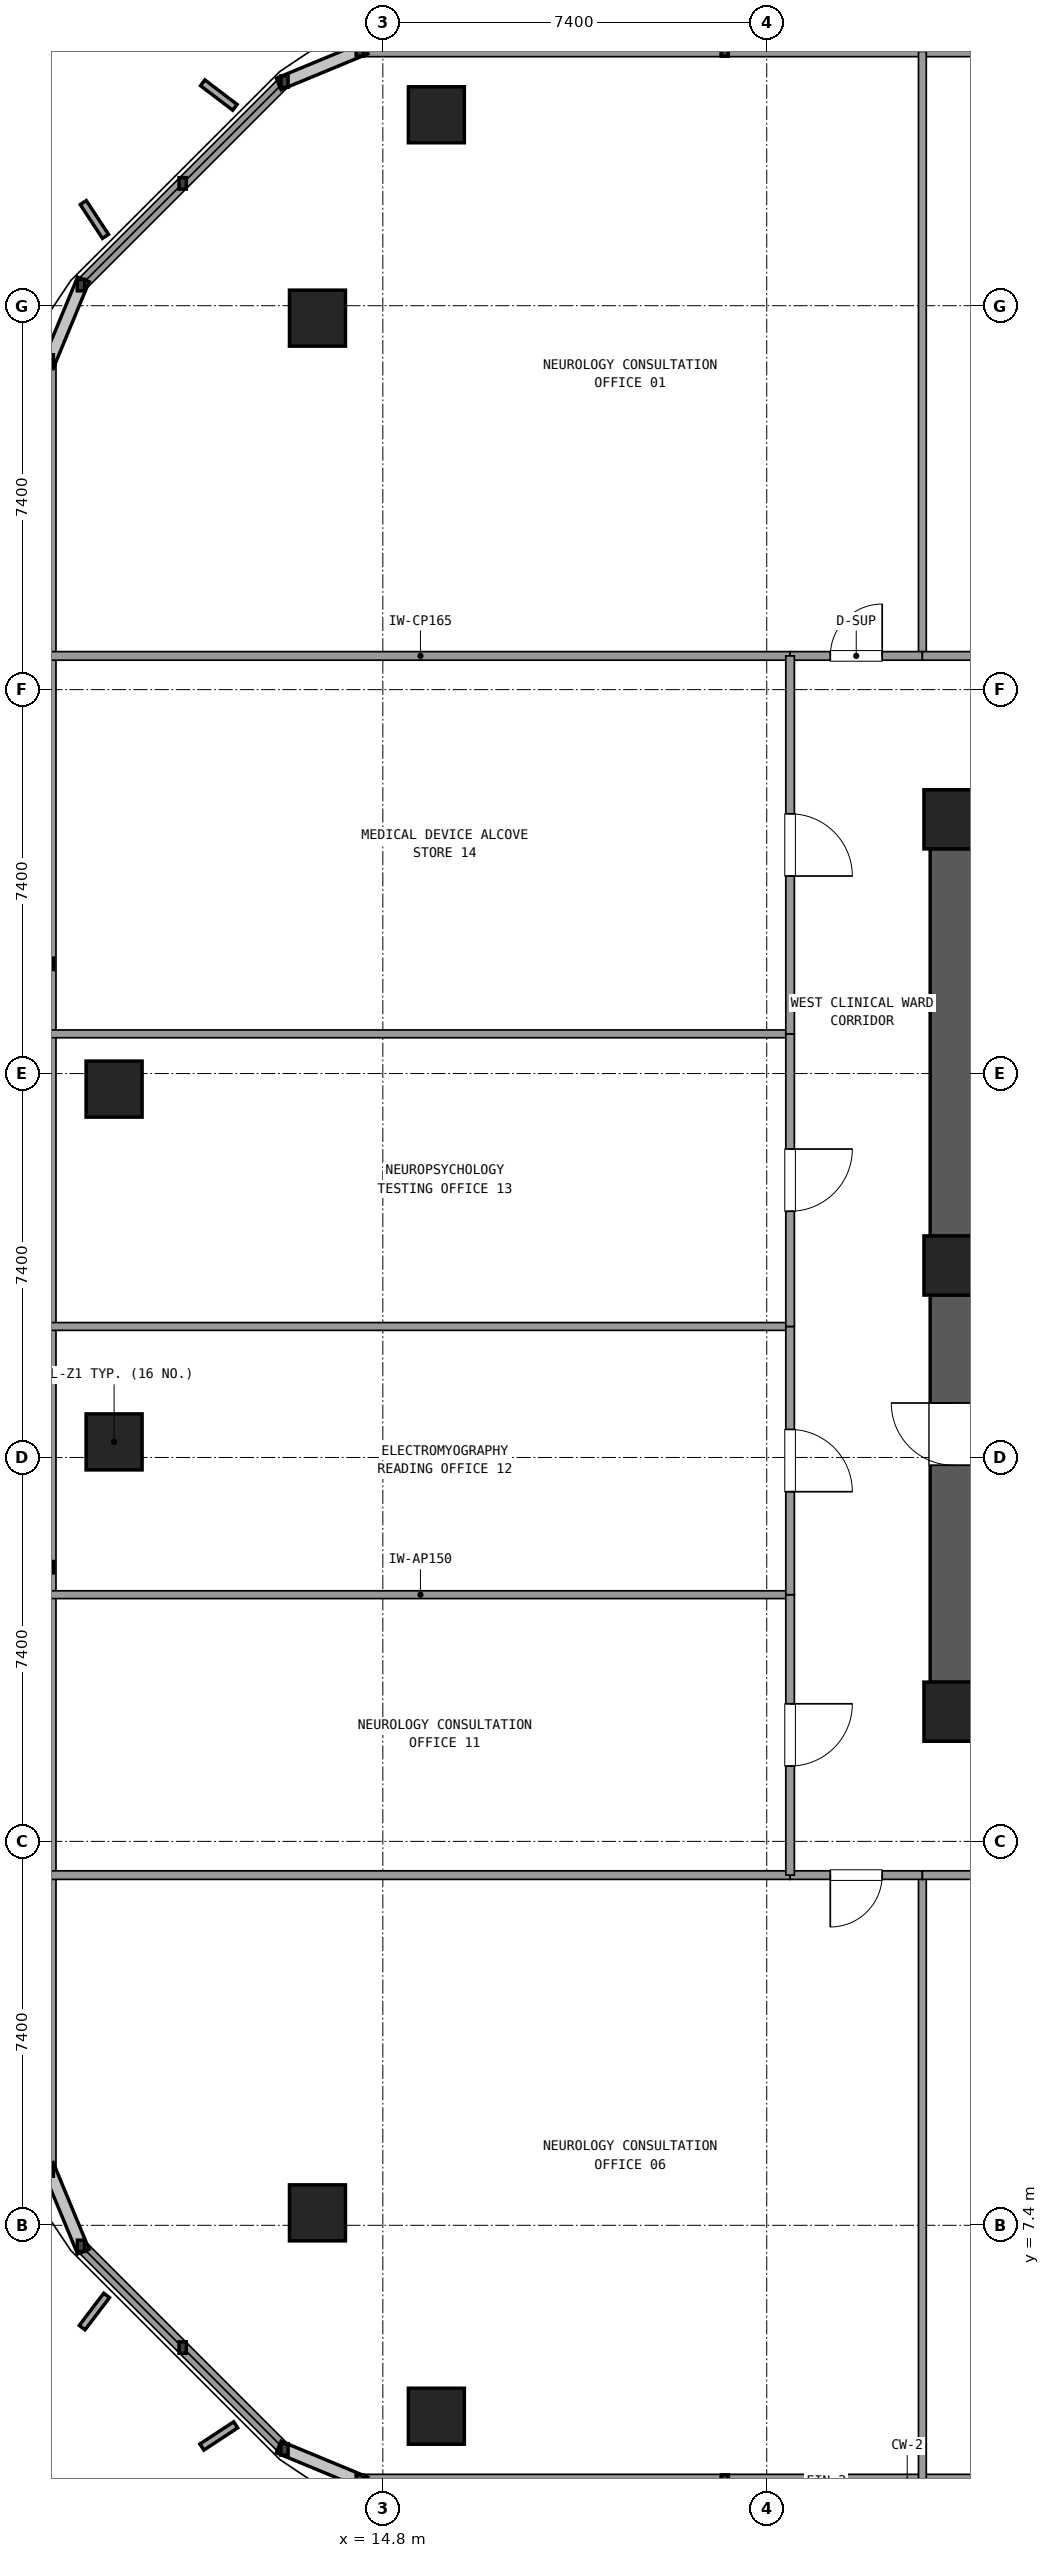
"""IFC4 building model, lengths in metres.
Left out: names, types, materials, properties, quantities, classifications, styles, units other than length and angle.
Written with IfcOpenShell. Run it as: python <this file> out.ifc"""

import sys

from ifc_helpers import new_model, si_unit, direction, frame, frame_2d, origin, origin_2d, place, context, subcontext, project, spatial, rectangle, extrude, element, fill, save


model = new_model("IFC4")
c1 = context("Model", 3, precision=1e-05, world=origin(), true_north=direction((0.0, 1.0)))
c2 = subcontext(c1, "Body", "Model", "MODEL_VIEW")
j1 = project(units=[si_unit("LENGTHUNIT", "METRE"), si_unit("PLANEANGLEUNIT", "RADIAN")], contexts=[c1])
p1 = place(None, origin())
s1 = spatial("IfcSite", under=j1, at=p1, CompositionType="ELEMENT")
p2 = place(p1, origin())
s2 = spatial("IfcBuilding", under=s1, at=p2, CompositionType="ELEMENT")
p3 = place(p2, frame((0.0, 0.0, 67.14)))
s3 = spatial("IfcBuildingStorey", under=s2, at=p3, CompositionType="ELEMENT", Elevation=67.14)
for number, where, z_axis, x_axis in (
    (1, (25.8, 17.3, 0.0), (0.0, 0.0, 1.0), (1.0, 0.0, 0.0)),
    (2, (25.8, 34.5, 0.0), (0.0, 0.0, 1.0), (1.0, 0.0, 0.0)),
    (3, (25.8, 25.9, 0.0), (0.0, 0.0, 1.0), (1.0, 0.0, 0.0)),
):
    element("IfcColumn", number, at=place(p3, frame(where, z_axis=z_axis, x_axis=x_axis)), inside=s3, PredefinedType="COLUMN", context=c2, shape_type="SweptSolid", body=[
        extrude(rectangle(XDim=1.14, YDim=1.14, at=origin_2d()), origin(), (0.0, 0.0, 1.0), 3.6),
    ])
p4 = place(p3, frame((25.8, 33.935, 0.0), z_axis=(0.0, 0.0, 1.0), x_axis=(0.0, -1.0, 0.0)))
e4 = element("IfcWall", 4, at=p4, inside=s3, PredefinedType="SHEAR", context=c2, shape_type="SweptSolid", body=[
    extrude(rectangle(XDim=7.47, YDim=0.9, at=frame_2d((3.735, 0.0))), origin(), (0.0, 0.0, 1.0), 3.3),
])
p5 = place(p3, frame((25.8, 25.335, 0.0), z_axis=(0.0, 0.0, 1.0), x_axis=(0.0, -1.0, 0.0)))
e5 = element("IfcWall", 5, at=p5, inside=s3, PredefinedType="SHEAR", context=c2, shape_type="SweptSolid", body=[
    extrude(rectangle(XDim=7.47, YDim=0.9, at=frame_2d((3.735, 0.0))), origin(), (0.0, 0.0, 1.0), 3.3),
])
p6 = place(p5, frame((2.085, 0.0, 0.0)))
e6 = element("IfcOpeningElement", 6, at=p6, cuts=e5, PredefinedType="OPENING", context=c2, shape_type="SweptSolid", body=[
    extrude(rectangle(XDim=1.2, YDim=2.15, at=frame_2d((0.6, 1.075))), frame((0.0, 0.46, 0.0), z_axis=(0.0, -1.0, 0.0), x_axis=(1.0, 0.0, 0.0)), (0.0, 0.0, 1.0), 0.92),
])
for number, where, z_axis, x_axis in (
    (7, (9.62, 22.5, 0.0), (0.0, 0.0, 1.0), (1.0, 0.0, 0.0)),
    (8, (13.54, 7.64, 0.0), (0.0, 0.0, 1.0), (1.0, 0.0, 0.0)),
    (9, (15.832, 3.72, 0.0), (0.0, 0.0, 1.0), (1.0, 0.0, 0.0)),
    (10, (15.832, 48.08, 0.0), (0.0, 0.0, 1.0), (1.0, 0.0, 0.0)),
    (11, (13.54, 44.16, 0.0), (0.0, 0.0, 1.0), (1.0, 0.0, 0.0)),
    (12, (9.62, 29.3, 0.0), (0.0, 0.0, 1.0), (1.0, 0.0, 0.0)),
):
    element("IfcColumn", number, at=place(p3, frame(where, z_axis=z_axis, x_axis=x_axis)), inside=s3, PredefinedType="COLUMN", context=c2, shape_type="SweptSolid", body=[
        extrude(rectangle(XDim=1.08, YDim=1.08, at=origin_2d()), origin(), (0.0, 0.0, 1.0), 3.6),
    ])
for number, where, z_axis, x_axis in (
    (13, (14.355, 2.48, 0.0), (0.0, 0.0, 1.0), (1.0, 0.0, 0.0)),
    (14, (35.46, 49.32, 0.0), (0.0, 0.0, 1.0), (-1.0, 0.0, 0.0)),
):
    element("IfcWall", number, at=place(p3, frame(where, z_axis=z_axis, x_axis=x_axis)), inside=s3, PredefinedType="SOLIDWALL", context=c2, shape_type="SweptSolid", body=[
        extrude(rectangle(XDim=21.105, YDim=0.24, at=frame_2d((10.552, 0.0))), origin(), (0.0, 0.0, 1.0), 0.85),
    ])
p7 = place(p3, frame((12.904, 48.719, 0.0), z_axis=(0.0, 0.0, 1.0), x_axis=(-0.707106781187, -0.707106781187, 0.0)))
e15 = element("IfcWall", 15, at=p7, inside=s3, PredefinedType="SOLIDWALL", context=c2, shape_type="SweptSolid", body=[
    extrude(rectangle(XDim=5.548, YDim=0.24, at=frame_2d((2.774, 0.0))), origin(), (0.0, 0.0, 1.0), 0.85),
])
p8 = place(p3, frame((8.38, 43.345, 0.0), z_axis=(0.0, 0.0, 1.0), x_axis=(0.0, -1.0, 0.0)))
e16 = element("IfcWall", 16, at=p8, inside=s3, PredefinedType="SOLIDWALL", context=c2, shape_type="SweptSolid", body=[
    extrude(rectangle(XDim=34.89, YDim=0.24, at=frame_2d((17.445, 0.0))), origin(), (0.0, 0.0, 1.0), 0.85),
])
p9 = place(p3, frame((8.981, 7.004, 0.0), z_axis=(0.0, 0.0, 1.0), x_axis=(0.707128783731, -0.707084777957, 0.0)))
e17 = element("IfcWall", 17, at=p9, inside=s3, PredefinedType="SOLIDWALL", context=c2, shape_type="SweptSolid", body=[
    extrude(rectangle(XDim=5.548, YDim=0.24, at=frame_2d((2.774, 0.0))), origin(), (0.0, 0.0, 1.0), 0.85),
])
for number, where, z_axis, x_axis in (
    (18, (8.4, 37.65, 0.0), (0.0, 0.0, 1.0), (1.0, 0.0, 0.0)),
    (19, (8.4, 14.15, 0.0), (0.0, 0.0, 1.0), (1.0, 0.0, 0.0)),
):
    element("IfcWall", number, at=place(p3, frame(where, z_axis=z_axis, x_axis=x_axis)), inside=s3, PredefinedType="PARTITIONING", context=c2, shape_type="SweptSolid", body=[
        extrude(rectangle(XDim=14.25, YDim=0.165, at=frame_2d((7.125, 0.0))), origin(), (0.0, 0.0, 1.0), 2.59),
    ])
p10 = place(p3, frame((25.2, 37.65, 0.0), z_axis=(0.0, 0.0, 1.0), x_axis=(0.0, 1.0, 0.0)))
e20 = element("IfcWall", 20, at=p10, inside=s3, PredefinedType="PARTITIONING", context=c2, shape_type="SweptSolid", body=[
    extrude(rectangle(XDim=11.65, YDim=0.15, at=frame_2d((5.825, 0.0))), origin(), (0.0, 0.0, 1.0), 2.59),
])
p11 = place(p3, frame((22.65, 37.65, 0.0), z_axis=(0.0, 0.0, 1.0), x_axis=(1.0, 0.0, 0.0)))
e21 = element("IfcWall", 21, at=p11, inside=s3, PredefinedType="PARTITIONING", context=c2, shape_type="SweptSolid", body=[
    extrude(rectangle(XDim=2.55, YDim=0.165, at=frame_2d((1.275, 0.0))), origin(), (0.0, 0.0, 1.0), 2.59),
])
p12 = place(p11, frame((0.775, 0.0, 0.0)))
e22 = element("IfcOpeningElement", 22, at=p12, cuts=e21, PredefinedType="OPENING", context=c2, shape_type="SweptSolid", body=[
    extrude(rectangle(XDim=1.0, YDim=2.15, at=frame_2d((0.5, 1.075))), frame((0.0, 0.093, 0.0), z_axis=(0.0, -1.0, 0.0), x_axis=(1.0, 0.0, 0.0)), (0.0, 0.0, 1.0), 0.185),
])
p13 = place(p3, frame((25.2, 37.65, 0.0), z_axis=(0.0, 0.0, 1.0), x_axis=(1.0, 0.0, 0.0)))
e23 = element("IfcWall", 23, at=p13, inside=s3, PredefinedType="PARTITIONING", context=c2, shape_type="SweptSolid", body=[
    extrude(rectangle(XDim=7.751, YDim=0.165, at=frame_2d((3.875, 0.0))), origin(), (0.0, 0.0, 1.0), 2.59),
])
p14 = place(p13, frame((3.276, 0.0, 0.0)))
e24 = element("IfcOpeningElement", 24, at=p14, cuts=e23, PredefinedType="OPENING", context=c2, shape_type="SweptSolid", body=[
    extrude(rectangle(XDim=1.2, YDim=2.15, at=frame_2d((0.6, 1.075))), frame((0.0, 0.093, 0.0), z_axis=(0.0, -1.0, 0.0), x_axis=(1.0, 0.0, 0.0)), (0.0, 0.0, 1.0), 0.185),
])
p15 = place(p3, frame((25.2, 14.15, 0.0), z_axis=(0.0, 0.0, 1.0), x_axis=(0.0, -1.0, 0.0)))
e25 = element("IfcWall", 25, at=p15, inside=s3, PredefinedType="PARTITIONING", context=c2, shape_type="SweptSolid", body=[
    extrude(rectangle(XDim=11.65, YDim=0.15, at=frame_2d((5.825, 0.0))), origin(), (0.0, 0.0, 1.0), 2.59),
])
p16 = place(p3, frame((22.65, 14.15, 0.0), z_axis=(0.0, 0.0, 1.0), x_axis=(1.0, 0.0, 0.0)))
e26 = element("IfcWall", 26, at=p16, inside=s3, PredefinedType="PARTITIONING", context=c2, shape_type="SweptSolid", body=[
    extrude(rectangle(XDim=2.55, YDim=0.165, at=frame_2d((1.275, 0.0))), origin(), (0.0, 0.0, 1.0), 2.59),
])
p17 = place(p16, frame((0.775, 0.0, 0.0)))
e27 = element("IfcOpeningElement", 27, at=p17, cuts=e26, PredefinedType="OPENING", context=c2, shape_type="SweptSolid", body=[
    extrude(rectangle(XDim=1.0, YDim=2.15, at=frame_2d((0.5, 1.075))), frame((0.0, 0.093, 0.0), z_axis=(0.0, -1.0, 0.0), x_axis=(1.0, 0.0, 0.0)), (0.0, 0.0, 1.0), 0.185),
])
p18 = place(p3, frame((25.2, 14.15, 0.0), z_axis=(0.0, 0.0, 1.0), x_axis=(1.0, 0.0, 0.0)))
e28 = element("IfcWall", 28, at=p18, inside=s3, PredefinedType="PARTITIONING", context=c2, shape_type="SweptSolid", body=[
    extrude(rectangle(XDim=6.284, YDim=0.165, at=frame_2d((3.142, 0.0))), origin(), (0.0, 0.0, 1.0), 2.59),
])
p19 = place(p18, frame((2.542, 0.0, 0.0)))
e29 = element("IfcOpeningElement", 29, at=p19, cuts=e28, PredefinedType="OPENING", context=c2, shape_type="SweptSolid", body=[
    extrude(rectangle(XDim=1.2, YDim=2.15, at=frame_2d((0.6, 1.075))), frame((0.0, 0.093, 0.0), z_axis=(0.0, -1.0, 0.0), x_axis=(1.0, 0.0, 0.0)), (0.0, 0.0, 1.0), 0.185),
])
p20 = place(p3, frame((22.65, 19.555, 0.0), z_axis=(0.0, 0.0, 1.0), x_axis=(-1.0, 0.0, 0.0)))
e30 = element("IfcWall", 30, at=p20, inside=s3, PredefinedType="PARTITIONING", context=c2, shape_type="SweptSolid", body=[
    extrude(rectangle(XDim=14.25, YDim=0.15, at=frame_2d((7.125, 0.0))), origin(), (0.0, 0.0, 1.0), 2.59),
])
p21 = place(p3, frame((22.65, 14.15, 0.0), z_axis=(0.0, 0.0, 1.0), x_axis=(0.0, 1.0, 0.0)))
e31 = element("IfcWall", 31, at=p21, inside=s3, PredefinedType="PARTITIONING", context=c2, shape_type="SweptSolid", body=[
    extrude(rectangle(XDim=5.405, YDim=0.165, at=frame_2d((2.703, 0.0))), origin(), (0.0, 0.0, 1.0), 2.59),
])
p22 = place(p21, frame((2.102, 0.0, 0.0)))
e32 = element("IfcOpeningElement", 32, at=p22, cuts=e31, PredefinedType="OPENING", context=c2, shape_type="SweptSolid", body=[
    extrude(rectangle(XDim=1.2, YDim=2.15, at=frame_2d((0.6, 1.075))), frame((0.0, 0.093, 0.0), z_axis=(0.0, -1.0, 0.0), x_axis=(1.0, 0.0, 0.0)), (0.0, 0.0, 1.0), 0.185),
])
p23 = place(p3, frame((22.65, 24.725, 0.0), z_axis=(0.0, 0.0, 1.0), x_axis=(-1.0, 0.0, 0.0)))
e33 = element("IfcWall", 33, at=p23, inside=s3, PredefinedType="PARTITIONING", context=c2, shape_type="SweptSolid", body=[
    extrude(rectangle(XDim=14.25, YDim=0.15, at=frame_2d((7.125, 0.0))), origin(), (0.0, 0.0, 1.0), 2.59),
])
p24 = place(p3, frame((22.65, 19.555, 0.0), z_axis=(0.0, 0.0, 1.0), x_axis=(0.0, 1.0, 0.0)))
e34 = element("IfcWall", 34, at=p24, inside=s3, PredefinedType="PARTITIONING", context=c2, shape_type="SweptSolid", body=[
    extrude(rectangle(XDim=5.17, YDim=0.165, at=frame_2d((2.585, 0.0))), origin(), (0.0, 0.0, 1.0), 2.59),
])
p25 = place(p24, frame((1.985, 0.0, 0.0)))
e35 = element("IfcOpeningElement", 35, at=p25, cuts=e34, PredefinedType="OPENING", context=c2, shape_type="SweptSolid", body=[
    extrude(rectangle(XDim=1.2, YDim=2.15, at=frame_2d((0.6, 1.075))), frame((0.0, 0.093, 0.0), z_axis=(0.0, -1.0, 0.0), x_axis=(1.0, 0.0, 0.0)), (0.0, 0.0, 1.0), 0.185),
])
p26 = place(p3, frame((22.65, 30.365, 0.0), z_axis=(0.0, 0.0, 1.0), x_axis=(-1.0, 0.0, 0.0)))
e36 = element("IfcWall", 36, at=p26, inside=s3, PredefinedType="PARTITIONING", context=c2, shape_type="SweptSolid", body=[
    extrude(rectangle(XDim=14.25, YDim=0.15, at=frame_2d((7.125, 0.0))), origin(), (0.0, 0.0, 1.0), 2.59),
])
p27 = place(p3, frame((22.65, 24.725, 0.0), z_axis=(0.0, 0.0, 1.0), x_axis=(0.0, 1.0, 0.0)))
e37 = element("IfcWall", 37, at=p27, inside=s3, PredefinedType="PARTITIONING", context=c2, shape_type="SweptSolid", body=[
    extrude(rectangle(XDim=5.64, YDim=0.165, at=frame_2d((2.82, 0.0))), origin(), (0.0, 0.0, 1.0), 2.59),
])
p28 = place(p27, frame((2.22, 0.0, 0.0)))
e38 = element("IfcOpeningElement", 38, at=p28, cuts=e37, PredefinedType="OPENING", context=c2, shape_type="SweptSolid", body=[
    extrude(rectangle(XDim=1.2, YDim=2.15, at=frame_2d((0.6, 1.075))), frame((0.0, 0.093, 0.0), z_axis=(0.0, -1.0, 0.0), x_axis=(1.0, 0.0, 0.0)), (0.0, 0.0, 1.0), 0.185),
])
p29 = place(p3, frame((22.65, 30.365, 0.0), z_axis=(0.0, 0.0, 1.0), x_axis=(0.0, 1.0, 0.0)))
e39 = element("IfcWall", 39, at=p29, inside=s3, PredefinedType="PARTITIONING", context=c2, shape_type="SweptSolid", body=[
    extrude(rectangle(XDim=7.285, YDim=0.165, at=frame_2d((3.643, 0.0))), origin(), (0.0, 0.0, 1.0), 2.59),
])
p30 = place(p29, frame((3.042, 0.0, 0.0)))
e40 = element("IfcOpeningElement", 40, at=p30, cuts=e39, PredefinedType="OPENING", context=c2, shape_type="SweptSolid", body=[
    extrude(rectangle(XDim=1.2, YDim=2.15, at=frame_2d((0.6, 1.075))), frame((0.0, 0.093, 0.0), z_axis=(0.0, -1.0, 0.0), x_axis=(1.0, 0.0, 0.0)), (0.0, 0.0, 1.0), 0.185),
])
p31 = place(p6, frame((1.2, 0.0, 0.0), z_axis=(0.0, 0.0, 1.0), x_axis=(-1.0, 0.0, 0.0)))
e41 = element("IfcDoor", 41, at=p31, inside=s3, OperationType="SINGLE_SWING_LEFT", PredefinedType="DOOR", context=c2, shape_type="SweptSolid", body=[
    extrude(rectangle(XDim=1.2, YDim=2.15, at=frame_2d((0.6, 1.075))), frame((0.0, 0.025, 0.0), z_axis=(0.0, -1.0, 0.0), x_axis=(1.0, 0.0, 0.0)), (0.0, 0.0, 1.0), 0.05),
])
fill(e6, e41)
p32 = place(p12, origin())
e42 = element("IfcDoor", 42, at=p32, inside=s3, OperationType="SINGLE_SWING_RIGHT", PredefinedType="DOOR", context=c2, shape_type="SweptSolid", body=[
    extrude(rectangle(XDim=1.0, YDim=2.15, at=frame_2d((0.5, 1.075))), frame((0.0, 0.025, 0.0), z_axis=(0.0, -1.0, 0.0), x_axis=(1.0, 0.0, 0.0)), (0.0, 0.0, 1.0), 0.05),
])
fill(e22, e42)
p33 = place(p17, frame((1.0, 0.0, 0.0), z_axis=(0.0, 0.0, 1.0), x_axis=(-1.0, 0.0, 0.0)))
e43 = element("IfcDoor", 43, at=p33, inside=s3, OperationType="SINGLE_SWING_LEFT", PredefinedType="DOOR", context=c2, shape_type="SweptSolid", body=[
    extrude(rectangle(XDim=1.0, YDim=2.15, at=frame_2d((0.5, 1.075))), frame((0.0, 0.025, 0.0), z_axis=(0.0, -1.0, 0.0), x_axis=(1.0, 0.0, 0.0)), (0.0, 0.0, 1.0), 0.05),
])
fill(e27, e43)
p34 = place(p22, frame((1.2, 0.0, 0.0), z_axis=(0.0, 0.0, 1.0), x_axis=(-1.0, 0.0, 0.0)))
e44 = element("IfcDoor", 44, at=p34, inside=s3, OperationType="SINGLE_SWING_RIGHT", PredefinedType="DOOR", context=c2, shape_type="SweptSolid", body=[
    extrude(rectangle(XDim=1.2, YDim=2.15, at=frame_2d((0.6, 1.075))), frame((0.0, 0.025, 0.0), z_axis=(0.0, -1.0, 0.0), x_axis=(1.0, 0.0, 0.0)), (0.0, 0.0, 1.0), 0.05),
])
fill(e32, e44)
p35 = place(p25, frame((1.2, 0.0, 0.0), z_axis=(0.0, 0.0, 1.0), x_axis=(-1.0, 0.0, 0.0)))
e45 = element("IfcDoor", 45, at=p35, inside=s3, OperationType="SINGLE_SWING_LEFT", PredefinedType="DOOR", context=c2, shape_type="SweptSolid", body=[
    extrude(rectangle(XDim=1.2, YDim=2.15, at=frame_2d((0.6, 1.075))), frame((0.0, 0.025, 0.0), z_axis=(0.0, -1.0, 0.0), x_axis=(1.0, 0.0, 0.0)), (0.0, 0.0, 1.0), 0.05),
])
fill(e35, e45)
p36 = place(p28, frame((1.2, 0.0, 0.0), z_axis=(0.0, 0.0, 1.0), x_axis=(-1.0, 0.0, 0.0)))
e46 = element("IfcDoor", 46, at=p36, inside=s3, OperationType="SINGLE_SWING_RIGHT", PredefinedType="DOOR", context=c2, shape_type="SweptSolid", body=[
    extrude(rectangle(XDim=1.2, YDim=2.15, at=frame_2d((0.6, 1.075))), frame((0.0, 0.025, 0.0), z_axis=(0.0, -1.0, 0.0), x_axis=(1.0, 0.0, 0.0)), (0.0, 0.0, 1.0), 0.05),
])
fill(e38, e46)
p37 = place(p30, frame((1.2, 0.0, 0.0), z_axis=(0.0, 0.0, 1.0), x_axis=(-1.0, 0.0, 0.0)))
e47 = element("IfcDoor", 47, at=p37, inside=s3, OperationType="SINGLE_SWING_LEFT", PredefinedType="DOOR", context=c2, shape_type="SweptSolid", body=[
    extrude(rectangle(XDim=1.2, YDim=2.15, at=frame_2d((0.6, 1.075))), frame((0.0, 0.025, 0.0), z_axis=(0.0, -1.0, 0.0), x_axis=(1.0, 0.0, 0.0)), (0.0, 0.0, 1.0), 0.05),
])
fill(e40, e47)
save(model, sys.argv[1])
